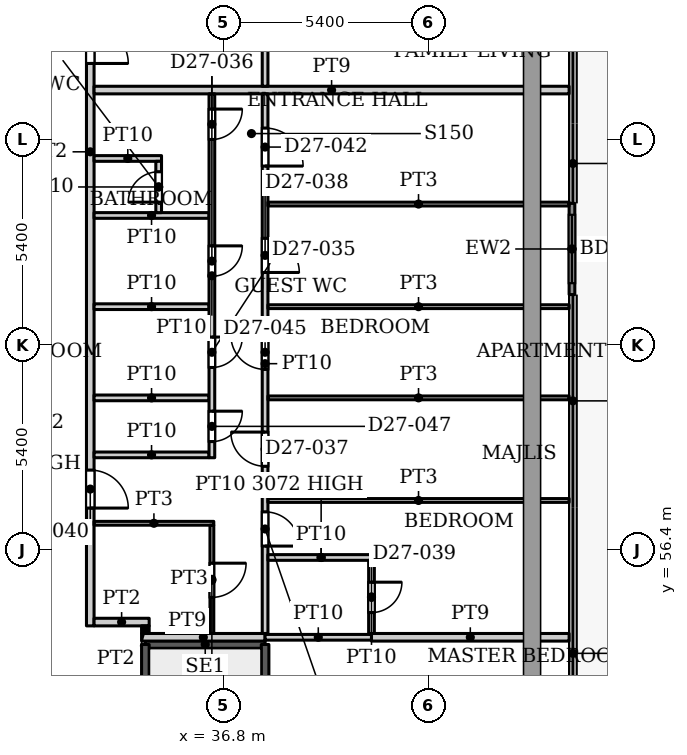
"""IFC4 building model, lengths in metres.
Left out: names, types, materials, properties, quantities, classifications, styles, units other than length and angle.
Written with IfcOpenShell. Run it as: python <this file> out.ifc"""

import sys

from ifc_helpers import new_model, si_unit, direction, frame, frame_2d, origin, place, context, subcontext, project, spatial, rectangle, extrude, source, transform, mapped, element, fill, save


model = new_model("IFC4")
c1 = context("Model", 3, precision=1e-05, world=origin(), true_north=direction((0.0, 1.0)))
c2 = subcontext(c1, "Body", "Model", "MODEL_VIEW")
j1 = project(units=[si_unit("LENGTHUNIT", "METRE"), si_unit("PLANEANGLEUNIT", "RADIAN")], contexts=[c1])
p1 = place(None, origin())
s1 = spatial("IfcSite", under=j1, at=p1, CompositionType="ELEMENT")
p2 = place(p1, origin())
s2 = spatial("IfcBuilding", under=s1, at=p2, CompositionType="ELEMENT")
p3 = place(p2, frame((0.0, 0.0, 121.4)))
s3 = spatial("IfcBuildingStorey", under=s2, at=p3, CompositionType="ELEMENT", Elevation=121.4)
p4 = place(p3, frame((45.975, 65.518, 0.0), z_axis=(0.0, 0.0, 1.0), x_axis=(0.0, -1.0, 0.0)))
e1 = element("IfcWall", 1, at=p4, inside=s3, PredefinedType="SOLIDWALL", context=c2, shape_type="SweptSolid", body=[
    extrude(rectangle(XDim=2.4, YDim=0.15, at=frame_2d((1.2, 0.0))), origin(), (0.0, 0.0, 1.0), 3.75),
])
p5 = place(p4, frame((0.3, 0.0, 0.0)))
e2 = element("IfcOpeningElement", 2, at=p5, cuts=e1, PredefinedType="OPENING", context=c2, shape_type="SweptSolid", body=[
    extrude(rectangle(XDim=1.8, YDim=2.4, at=frame_2d((0.9, 1.2))), frame((0.0, 0.085, 0.0), z_axis=(0.0, -1.0, 0.0), x_axis=(1.0, 0.0, 0.0)), (0.0, 0.0, 1.0), 0.17),
])
p6 = place(p3, frame((34.75, 53.91, 0.0), z_axis=(0.0, 0.0, 1.0), x_axis=(1.0, 0.0, 0.0)))
e3 = element("IfcWall", 3, at=p6, inside=s3, PredefinedType="SHEAR", context=c2, shape_type="SweptSolid", body=[
    extrude(rectangle(XDim=3.15, YDim=0.2, at=frame_2d((1.575, 0.0))), origin(), (0.0, 0.0, 1.0), 3.9),
])
p7 = place(p3, frame((34.75, 47.5, 0.0), z_axis=(0.0, 0.0, 1.0), x_axis=(0.0, 1.0, 0.0)))
e4 = element("IfcWall", 4, at=p7, inside=s3, PredefinedType="SHEAR", context=c2, shape_type="SweptSolid", body=[
    extrude(rectangle(XDim=6.41, YDim=0.2, at=frame_2d((3.205, 0.0))), origin(), (0.0, 0.0, 1.0), 3.9),
])
p8 = place(p3, frame((37.9, 44.75, 0.0), z_axis=(0.0, 0.0, 1.0), x_axis=(0.0, 1.0, 0.0)))
e5 = element("IfcWall", 5, at=p8, inside=s3, PredefinedType="SHEAR", context=c2, shape_type="SweptSolid", body=[
    extrude(rectangle(XDim=9.16, YDim=0.2, at=frame_2d((4.58, 0.0))), origin(), (0.0, 0.0, 1.0), 3.9),
])
p9 = place(p3, frame((33.3, 54.4, 0.0), z_axis=(0.0, 0.0, 1.0), x_axis=(0.0, 1.0, 0.0)))
e6 = element("IfcWall", 6, at=p9, inside=s3, PredefinedType="PARTITIONING", context=c2, shape_type="SweptSolid", body=[
    extrude(rectangle(XDim=24.95, YDim=0.2, at=frame_2d((12.475, 0.0))), origin(), (0.0, 0.0, 1.0), 3.6),
])
p10 = place(p9, frame((3.1, 0.0, 0.0)))
e7 = element("IfcOpeningElement", 7, at=p10, cuts=e6, PredefinedType="OPENING", context=c2, shape_type="SweptSolid", body=[
    extrude(rectangle(XDim=1.0, YDim=2.1, at=frame_2d((0.5, 1.05))), frame((0.0, 0.11, 0.0), z_axis=(0.0, -1.0, 0.0), x_axis=(1.0, 0.0, 0.0)), (0.0, 0.0, 1.0), 0.22),
])
p11 = place(p9, frame((14.8, 0.0, 0.0)))
e8 = element("IfcOpeningElement", 8, at=p11, cuts=e6, PredefinedType="OPENING", context=c2, shape_type="SweptSolid", body=[
    extrude(rectangle(XDim=1.0, YDim=2.1, at=frame_2d((0.5, 1.05))), frame((0.0, 0.11, 0.0), z_axis=(0.0, -1.0, 0.0), x_axis=(1.0, 0.0, 0.0)), (0.0, 0.0, 1.0), 0.22),
])
p12 = place(p3, frame((33.4, 54.5, 0.0), z_axis=(0.0, 0.0, 1.0), x_axis=(1.0, 0.0, 0.0)))
e9 = element("IfcWall", 9, at=p12, inside=s3, PredefinedType="PARTITIONING", context=c2, shape_type="SweptSolid", body=[
    extrude(rectangle(XDim=1.45, YDim=0.2, at=frame_2d((0.725, 0.0))), origin(), (0.0, 0.0, 1.0), 3.6),
])
p13 = place(p3, frame((33.4, 57.1, 0.0), z_axis=(0.0, 0.0, 1.0), x_axis=(1.0, 0.0, 0.0)))
e10 = element("IfcWall", 10, at=p13, inside=s3, PredefinedType="PARTITIONING", context=c2, shape_type="SweptSolid", body=[
    extrude(rectangle(XDim=3.15, YDim=0.1, at=frame_2d((1.575, 0.0))), origin(), (0.0, 0.0, 1.0), 3.6),
])
for number, where, z_axis, x_axis in (
    (11, (33.4, 58.9, 0.0), (0.0, 0.0, 1.0), (1.0, 0.0, 0.0)),
    (12, (33.4, 60.4, 0.0), (0.0, 0.0, 1.0), (1.0, 0.0, 0.0)),
    (13, (33.4, 62.8, 0.0), (0.0, 0.0, 1.0), (1.0, 0.0, 0.0)),
    (14, (33.4, 65.2, 0.0), (0.0, 0.0, 1.0), (1.0, 0.0, 0.0)),
):
    element("IfcWall", number, at=place(p3, frame(where, z_axis=z_axis, x_axis=x_axis)), inside=s3, PredefinedType="PARTITIONING", context=c2, shape_type="SweptSolid", body=[
        extrude(rectangle(XDim=3.025, YDim=0.15, at=frame_2d((1.513, 0.0))), origin(), (0.0, 0.0, 1.0), 3.6),
    ])
p14 = place(p3, frame((33.4, 66.7, 0.0), z_axis=(0.0, 0.0, 1.0), x_axis=(1.0, 0.0, 0.0)))
e15 = element("IfcWall", 15, at=p14, inside=s3, PredefinedType="PARTITIONING", context=c2, shape_type="SweptSolid", body=[
    extrude(rectangle(XDim=1.775, YDim=0.15, at=frame_2d((0.888, 0.0))), origin(), (0.0, 0.0, 1.0), 3.6),
])
p15 = place(p3, frame((33.4, 68.5, 0.0), z_axis=(0.0, 0.0, 1.0), x_axis=(1.0, 0.0, 0.0)))
e16 = element("IfcWall", 16, at=p15, inside=s3, PredefinedType="PARTITIONING", context=c2, shape_type="SweptSolid", body=[
    extrude(rectangle(XDim=12.5, YDim=0.2, at=frame_2d((6.25, 0.0))), origin(), (0.0, 0.0, 1.0), 3.6),
])
p16 = place(p3, frame((34.65, 54.1, 0.0), z_axis=(0.0, 0.0, 1.0), x_axis=(1.0, 0.0, 0.0)))
e17 = element("IfcWall", 17, at=p16, inside=s3, PredefinedType="PARTITIONING", context=c2, shape_type="SweptSolid", body=[
    extrude(rectangle(XDim=3.25, YDim=0.2, at=frame_2d((1.625, 0.0))), origin(), (0.0, 0.0, 1.0), 3.6),
])
p17 = place(p3, frame((34.75, 54.2, 0.0), z_axis=(0.0, 0.0, 1.0), x_axis=(0.0, 1.0, 0.0)))
e18 = element("IfcWall", 18, at=p17, inside=s3, PredefinedType="PARTITIONING", context=c2, shape_type="SweptSolid", body=[
    extrude(rectangle(XDim=0.2, YDim=0.2, at=frame_2d((0.1, 0.0))), origin(), (0.0, 0.0, 1.0), 3.6),
])
p18 = place(p3, frame((35.1, 65.275, 0.0), z_axis=(0.0, 0.0, 1.0), x_axis=(0.0, 1.0, 0.0)))
e19 = element("IfcWall", 19, at=p18, inside=s3, PredefinedType="PARTITIONING", context=c2, shape_type="SweptSolid", body=[
    extrude(rectangle(XDim=1.35, YDim=0.15, at=frame_2d((0.675, 0.0))), origin(), (0.0, 0.0, 1.0), 3.6),
])
p19 = place(p18, frame((0.275, 0.0, 0.0)))
e20 = element("IfcOpeningElement", 20, at=p19, cuts=e19, PredefinedType="OPENING", context=c2, shape_type="SweptSolid", body=[
    extrude(rectangle(XDim=0.8, YDim=2.1, at=frame_2d((0.4, 1.05))), frame((0.0, 0.085, 0.0), z_axis=(0.0, -1.0, 0.0), x_axis=(1.0, 0.0, 0.0)), (0.0, 0.0, 1.0), 0.17),
])
p20 = place(p3, frame((36.5, 54.2, 0.0), z_axis=(0.0, 0.0, 1.0), x_axis=(0.0, 1.0, 0.0)))
e21 = element("IfcWall", 21, at=p20, inside=s3, PredefinedType="PARTITIONING", context=c2, shape_type="SweptSolid", body=[
    extrude(rectangle(XDim=2.85, YDim=0.1, at=frame_2d((1.425, 0.0))), origin(), (0.0, 0.0, 1.0), 3.6),
])
p21 = place(p20, frame((0.95, 0.0, 0.0)))
e22 = element("IfcOpeningElement", 22, at=p21, cuts=e21, PredefinedType="OPENING", context=c2, shape_type="SweptSolid", body=[
    extrude(rectangle(XDim=0.9, YDim=2.1, at=frame_2d((0.45, 1.05))), frame((0.0, 0.06, 0.0), z_axis=(0.0, -1.0, 0.0), x_axis=(1.0, 0.0, 0.0)), (0.0, 0.0, 1.0), 0.12),
])
p22 = place(p3, frame((36.5, 58.825, 0.0), z_axis=(0.0, 0.0, 1.0), x_axis=(0.0, 1.0, 0.0)))
e23 = element("IfcWall", 23, at=p22, inside=s3, PredefinedType="PARTITIONING", context=c2, shape_type="SweptSolid", body=[
    extrude(rectangle(XDim=9.575, YDim=0.15, at=frame_2d((4.788, 0.0))), origin(), (0.0, 0.0, 1.0), 3.6),
])
p23 = place(p22, frame((2.375, 0.0, 0.0)))
e24 = element("IfcOpeningElement", 24, at=p23, cuts=e23, PredefinedType="OPENING", context=c2, shape_type="SweptSolid", body=[
    extrude(rectangle(XDim=0.8, YDim=2.1, at=frame_2d((0.4, 1.05))), frame((0.0, 0.085, 0.0), z_axis=(0.0, -1.0, 0.0), x_axis=(1.0, 0.0, 0.0)), (0.0, 0.0, 1.0), 0.17),
])
p24 = place(p22, frame((4.775, 0.0, 0.0)))
e25 = element("IfcOpeningElement", 25, at=p24, cuts=e23, PredefinedType="OPENING", context=c2, shape_type="SweptSolid", body=[
    extrude(rectangle(XDim=0.8, YDim=2.1, at=frame_2d((0.4, 1.05))), frame((0.0, 0.085, 0.0), z_axis=(0.0, -1.0, 0.0), x_axis=(1.0, 0.0, 0.0)), (0.0, 0.0, 1.0), 0.17),
])
p25 = place(p22, frame((8.375, 0.0, 0.0)))
e26 = element("IfcOpeningElement", 26, at=p25, cuts=e23, PredefinedType="OPENING", context=c2, shape_type="SweptSolid", body=[
    extrude(rectangle(XDim=0.8, YDim=2.1, at=frame_2d((0.4, 1.05))), frame((0.0, 0.085, 0.0), z_axis=(0.0, -1.0, 0.0), x_axis=(1.0, 0.0, 0.0)), (0.0, 0.0, 1.0), 0.17),
])
p26 = place(p22, frame((0.425, 0.0, 0.0)))
e27 = element("IfcOpeningElement", 27, at=p26, cuts=e23, PredefinedType="OPENING", context=c2, shape_type="SweptSolid", body=[
    extrude(rectangle(XDim=0.8, YDim=2.1, at=frame_2d((0.4, 1.05))), frame((0.0, 0.085, 0.0), z_axis=(0.0, -1.0, 0.0), x_axis=(1.0, 0.0, 0.0)), (0.0, 0.0, 1.0), 0.17),
])
p27 = place(p3, frame((37.9, 54.1, 0.0), z_axis=(0.0, 0.0, 1.0), x_axis=(1.0, 0.0, 0.0)))
e28 = element("IfcWall", 28, at=p27, inside=s3, PredefinedType="PARTITIONING", context=c2, shape_type="SweptSolid", body=[
    extrude(rectangle(XDim=2.8, YDim=0.15, at=frame_2d((1.4, 0.0))), origin(), (0.0, 0.0, 1.0), 3.6),
])
p28 = place(p3, frame((37.9, 54.2, 0.0), z_axis=(0.0, 0.0, 1.0), x_axis=(0.0, 1.0, 0.0)))
e29 = element("IfcWall", 29, at=p28, inside=s3, PredefinedType="PARTITIONING", context=c2, shape_type="SweptSolid", body=[
    extrude(rectangle(XDim=14.2, YDim=0.15, at=frame_2d((7.1, 0.0))), origin(), (0.0, 0.0, 1.0), 3.6),
])
p29 = place(p28, frame((4.4, 0.0, 0.0)))
e30 = element("IfcOpeningElement", 30, at=p29, cuts=e29, PredefinedType="OPENING", context=c2, shape_type="SweptSolid", body=[
    extrude(rectangle(XDim=0.9, YDim=2.1, at=frame_2d((0.45, 1.05))), frame((0.0, 0.085, 0.0), z_axis=(0.0, -1.0, 0.0), x_axis=(1.0, 0.0, 0.0)), (0.0, 0.0, 1.0), 0.17),
])
p30 = place(p28, frame((9.5, 0.0, 0.0)))
e31 = element("IfcOpeningElement", 31, at=p30, cuts=e29, PredefinedType="OPENING", context=c2, shape_type="SweptSolid", body=[
    extrude(rectangle(XDim=0.9, YDim=2.1, at=frame_2d((0.45, 1.05))), frame((0.0, 0.085, 0.0), z_axis=(0.0, -1.0, 0.0), x_axis=(1.0, 0.0, 0.0)), (0.0, 0.0, 1.0), 0.17),
])
p31 = place(p28, frame((12.3, 0.0, 0.0)))
e32 = element("IfcOpeningElement", 32, at=p31, cuts=e29, PredefinedType="OPENING", context=c2, shape_type="SweptSolid", body=[
    extrude(rectangle(XDim=1.0, YDim=2.1, at=frame_2d((0.5, 1.05))), frame((0.0, 0.085, 0.0), z_axis=(0.0, -1.0, 0.0), x_axis=(1.0, 0.0, 0.0)), (0.0, 0.0, 1.0), 0.17),
])
p32 = place(p28, frame((6.95, 0.0, 0.0)))
e33 = element("IfcOpeningElement", 33, at=p32, cuts=e29, PredefinedType="OPENING", context=c2, shape_type="SweptSolid", body=[
    extrude(rectangle(XDim=0.9, YDim=2.1, at=frame_2d((0.45, 1.05))), frame((0.0, 0.085, 0.0), z_axis=(0.0, -1.0, 0.0), x_axis=(1.0, 0.0, 0.0)), (0.0, 0.0, 1.0), 0.17),
])
p33 = place(p28, frame((2.3, 0.0, 0.0)))
e34 = element("IfcOpeningElement", 34, at=p33, cuts=e29, PredefinedType="OPENING", context=c2, shape_type="SweptSolid", body=[
    extrude(rectangle(XDim=0.9, YDim=2.1, at=frame_2d((0.45, 1.05))), frame((0.0, 0.085, 0.0), z_axis=(0.0, -1.0, 0.0), x_axis=(1.0, 0.0, 0.0)), (0.0, 0.0, 1.0), 0.17),
])
p34 = place(p3, frame((37.9, 68.6, 0.0), z_axis=(0.0, 0.0, 1.0), x_axis=(0.0, 1.0, 0.0)))
e35 = element("IfcWall", 35, at=p34, inside=s3, PredefinedType="PARTITIONING", context=c2, shape_type="SweptSolid", body=[
    extrude(rectangle(XDim=10.65, YDim=0.15, at=frame_2d((5.325, 0.0))), origin(), (0.0, 0.0, 1.0), 3.6),
])
p35 = place(p34, frame((1.25, 0.0, 0.0)))
e36 = element("IfcOpeningElement", 36, at=p35, cuts=e35, PredefinedType="OPENING", context=c2, shape_type="SweptSolid", body=[
    extrude(rectangle(XDim=0.9, YDim=2.1, at=frame_2d((0.45, 1.05))), frame((0.0, 0.085, 0.0), z_axis=(0.0, -1.0, 0.0), x_axis=(1.0, 0.0, 0.0)), (0.0, 0.0, 1.0), 0.17),
])
p36 = place(p34, frame((8.4, 0.0, 0.0)))
e37 = element("IfcOpeningElement", 37, at=p36, cuts=e35, PredefinedType="OPENING", context=c2, shape_type="SweptSolid", body=[
    extrude(rectangle(XDim=1.0, YDim=2.1, at=frame_2d((0.5, 1.05))), frame((0.0, 0.085, 0.0), z_axis=(0.0, -1.0, 0.0), x_axis=(1.0, 0.0, 0.0)), (0.0, 0.0, 1.0), 0.17),
])
p37 = place(p34, frame((3.8, 0.0, 0.0)))
e38 = element("IfcOpeningElement", 38, at=p37, cuts=e35, PredefinedType="OPENING", context=c2, shape_type="SweptSolid", body=[
    extrude(rectangle(XDim=0.9, YDim=2.1, at=frame_2d((0.45, 1.05))), frame((0.0, 0.085, 0.0), z_axis=(0.0, -1.0, 0.0), x_axis=(1.0, 0.0, 0.0)), (0.0, 0.0, 1.0), 0.17),
])
p38 = place(p3, frame((37.975, 56.2, 0.0), z_axis=(0.0, 0.0, 1.0), x_axis=(1.0, 0.0, 0.0)))
e39 = element("IfcWall", 39, at=p38, inside=s3, PredefinedType="PARTITIONING", context=c2, shape_type="SweptSolid", body=[
    extrude(rectangle(XDim=2.8, YDim=0.15, at=frame_2d((1.4, 0.0))), origin(), (0.0, 0.0, 1.0), 3.072),
])
for number, where, z_axis, x_axis in (
    (40, (37.975, 57.7, 0.0), (0.0, 0.0, 1.0), (1.0, 0.0, 0.0)),
    (41, (37.975, 60.4, 0.0), (0.0, 0.0, 1.0), (1.0, 0.0, 0.0)),
    (42, (37.975, 62.8, 0.0), (0.0, 0.0, 1.0), (1.0, 0.0, 0.0)),
    (43, (37.975, 65.5, 0.0), (0.0, 0.0, 1.0), (1.0, 0.0, 0.0)),
):
    element("IfcWall", number, at=place(p3, frame(where, z_axis=z_axis, x_axis=x_axis)), inside=s3, PredefinedType="PARTITIONING", context=c2, shape_type="SweptSolid", body=[
        extrude(rectangle(XDim=7.925, YDim=0.1, at=frame_2d((3.962, 0.0))), origin(), (0.0, 0.0, 1.0), 3.6),
    ])
p39 = place(p3, frame((40.7, 54.1, 0.0), z_axis=(0.0, 0.0, 1.0), x_axis=(1.0, 0.0, 0.0)))
e44 = element("IfcWall", 44, at=p39, inside=s3, PredefinedType="PARTITIONING", context=c2, shape_type="SweptSolid", body=[
    extrude(rectangle(XDim=5.2, YDim=0.2, at=frame_2d((2.6, 0.0))), origin(), (0.0, 0.0, 1.0), 3.6),
])
p40 = place(p3, frame((40.7, 54.2, 0.0), z_axis=(0.0, 0.0, 1.0), x_axis=(0.0, 1.0, 0.0)))
e45 = element("IfcWall", 45, at=p40, inside=s3, PredefinedType="PARTITIONING", context=c2, shape_type="SweptSolid", body=[
    extrude(rectangle(XDim=1.925, YDim=0.15, at=frame_2d((0.962, 0.0))), origin(), (0.0, 0.0, 1.0), 3.6),
])
p41 = place(p40, frame((0.55, 0.0, 0.0)))
e46 = element("IfcOpeningElement", 46, at=p41, cuts=e45, PredefinedType="OPENING", context=c2, shape_type="SweptSolid", body=[
    extrude(rectangle(XDim=0.8, YDim=2.1, at=frame_2d((0.4, 1.05))), frame((0.0, 0.085, 0.0), z_axis=(0.0, -1.0, 0.0), x_axis=(1.0, 0.0, 0.0)), (0.0, 0.0, 1.0), 0.17),
])
m1 = source(origin(), c2, "Body", "SweptSolid", [
    extrude(rectangle(XDim=1.8, YDim=2.4, at=frame_2d((0.9, 1.2))), frame((0.0, 0.025, 0.0), z_axis=(0.0, -1.0, 0.0), x_axis=(1.0, 0.0, 0.0)), (0.0, 0.0, 1.0), 0.05),
])
p42 = place(p5, origin())
e47 = element("IfcDoor", 47, at=p42, inside=s3, OperationType="SLIDING_TO_LEFT", PredefinedType="DOOR", context=c2, shape_type="MappedRepresentation", body=[
    mapped(m1, transform((0.0, 0.0, 0.0), x_axis=(1.0, 0.0, 0.0), y_axis=(0.0, 1.0, 0.0), z_axis=(0.0, 0.0, 1.0), scale=1.0)),
])
fill(e2, e47)
m2 = source(origin(), c2, "Body", "SweptSolid", [
    extrude(rectangle(XDim=0.8, YDim=2.1, at=frame_2d((0.4, 1.05))), frame((0.0, 0.025, 0.0), z_axis=(0.0, -1.0, 0.0), x_axis=(1.0, 0.0, 0.0)), (0.0, 0.0, 1.0), 0.05),
])
p43 = place(p23, origin())
e48 = element("IfcDoor", 48, at=p43, inside=s3, OperationType="SINGLE_SWING_RIGHT", PredefinedType="DOOR", context=c2, shape_type="MappedRepresentation", body=[
    mapped(m2, transform((0.0, 0.0, 0.0), x_axis=(1.0, 0.0, 0.0), y_axis=(0.0, 1.0, 0.0), z_axis=(0.0, 0.0, 1.0), scale=1.0)),
])
fill(e24, e48)
p44 = place(p24, origin())
e49 = element("IfcDoor", 49, at=p44, inside=s3, OperationType="SINGLE_SWING_RIGHT", PredefinedType="DOOR", context=c2, shape_type="MappedRepresentation", body=[
    mapped(m2, transform((0.0, 0.0, 0.0), x_axis=(1.0, 0.0, 0.0), y_axis=(0.0, 1.0, 0.0), z_axis=(0.0, 0.0, 1.0), scale=1.0)),
])
fill(e25, e49)
m3 = source(origin(), c2, "Body", "SweptSolid", [
    extrude(rectangle(XDim=0.9, YDim=2.1, at=frame_2d((0.45, 1.05))), frame((0.0, 0.025, 0.0), z_axis=(0.0, -1.0, 0.0), x_axis=(1.0, 0.0, 0.0)), (0.0, 0.0, 1.0), 0.05),
])
p45 = place(p29, origin())
e50 = element("IfcDoor", 50, at=p45, inside=s3, OperationType="SINGLE_SWING_LEFT", PredefinedType="DOOR", context=c2, shape_type="MappedRepresentation", body=[
    mapped(m3, transform((0.0, 0.0, 0.0), x_axis=(1.0, 0.0, 0.0), y_axis=(0.0, 1.0, 0.0), z_axis=(0.0, 0.0, 1.0), scale=1.0)),
])
fill(e30, e50)
p46 = place(p30, origin())
e51 = element("IfcDoor", 51, at=p46, inside=s3, OperationType="SINGLE_SWING_RIGHT", PredefinedType="DOOR", context=c2, shape_type="MappedRepresentation", body=[
    mapped(m3, transform((0.0, 0.0, 0.0), x_axis=(1.0, 0.0, 0.0), y_axis=(0.0, 1.0, 0.0), z_axis=(0.0, 0.0, 1.0), scale=1.0)),
])
fill(e31, e51)
p47 = place(p41, origin())
e52 = element("IfcDoor", 52, at=p47, inside=s3, OperationType="SINGLE_SWING_RIGHT", PredefinedType="DOOR", context=c2, shape_type="MappedRepresentation", body=[
    mapped(m2, transform((0.0, 0.0, 0.0), x_axis=(1.0, 0.0, 0.0), y_axis=(0.0, 1.0, 0.0), z_axis=(0.0, 0.0, 1.0), scale=1.0)),
])
fill(e46, e52)
m4 = source(origin(), c2, "Body", "SweptSolid", [
    extrude(rectangle(XDim=1.0, YDim=2.1, at=frame_2d((0.5, 1.05))), frame((0.0, 0.025, 0.0), z_axis=(0.0, -1.0, 0.0), x_axis=(1.0, 0.0, 0.0)), (0.0, 0.0, 1.0), 0.05),
])
p48 = place(p10, origin())
e53 = element("IfcDoor", 53, at=p48, inside=s3, OperationType="SINGLE_SWING_RIGHT", PredefinedType="DOOR", context=c2, shape_type="MappedRepresentation", body=[
    mapped(m4, transform((0.0, 0.0, 0.0), x_axis=(1.0, 0.0, 0.0), y_axis=(0.0, 1.0, 0.0), z_axis=(0.0, 0.0, 1.0), scale=1.0)),
])
fill(e7, e53)
p49 = place(p21, origin())
e54 = element("IfcDoor", 54, at=p49, inside=s3, OperationType="SINGLE_SWING_RIGHT", PredefinedType="DOOR", context=c2, shape_type="MappedRepresentation", body=[
    mapped(m3, transform((0.0, 0.0, 0.0), x_axis=(1.0, 0.0, 0.0), y_axis=(0.0, 1.0, 0.0), z_axis=(0.0, 0.0, 1.0), scale=1.0)),
])
fill(e22, e54)
m5 = source(origin(), c2, "Body", "SweptSolid", [
    extrude(rectangle(XDim=1.0, YDim=2.1, at=frame_2d((0.5, 1.05))), frame((0.0, 0.025, 0.0), z_axis=(0.0, -1.0, 0.0), x_axis=(1.0, 0.0, 0.0)), (0.0, 0.0, 1.0), 0.05),
])
p50 = place(p31, origin())
e55 = element("IfcDoor", 55, at=p50, inside=s3, OperationType="SINGLE_SWING_RIGHT", PredefinedType="DOOR", context=c2, shape_type="MappedRepresentation", body=[
    mapped(m5, transform((0.0, 0.0, 0.0), x_axis=(1.0, 0.0, 0.0), y_axis=(0.0, 1.0, 0.0), z_axis=(0.0, 0.0, 1.0), scale=1.0)),
])
fill(e32, e55)
p51 = place(p25, origin())
e56 = element("IfcDoor", 56, at=p51, inside=s3, OperationType="SINGLE_SWING_RIGHT", PredefinedType="DOOR", context=c2, shape_type="MappedRepresentation", body=[
    mapped(m2, transform((0.0, 0.0, 0.0), x_axis=(1.0, 0.0, 0.0), y_axis=(0.0, 1.0, 0.0), z_axis=(0.0, 0.0, 1.0), scale=1.0)),
])
fill(e26, e56)
p52 = place(p19, origin())
e57 = element("IfcDoor", 57, at=p52, inside=s3, OperationType="SINGLE_SWING_LEFT", PredefinedType="DOOR", context=c2, shape_type="MappedRepresentation", body=[
    mapped(m2, transform((0.0, 0.0, 0.0), x_axis=(1.0, 0.0, 0.0), y_axis=(0.0, 1.0, 0.0), z_axis=(0.0, 0.0, 1.0), scale=1.0)),
])
fill(e20, e57)
p53 = place(p32, origin())
e58 = element("IfcDoor", 58, at=p53, inside=s3, OperationType="SINGLE_SWING_LEFT", PredefinedType="DOOR", context=c2, shape_type="MappedRepresentation", body=[
    mapped(m3, transform((0.0, 0.0, 0.0), x_axis=(1.0, 0.0, 0.0), y_axis=(0.0, 1.0, 0.0), z_axis=(0.0, 0.0, 1.0), scale=1.0)),
])
fill(e33, e58)
p54 = place(p33, origin())
e59 = element("IfcDoor", 59, at=p54, inside=s3, OperationType="SINGLE_SWING_RIGHT", PredefinedType="DOOR", context=c2, shape_type="MappedRepresentation", body=[
    mapped(m3, transform((0.0, 0.0, 0.0), x_axis=(1.0, 0.0, 0.0), y_axis=(0.0, 1.0, 0.0), z_axis=(0.0, 0.0, 1.0), scale=1.0)),
])
fill(e34, e59)
p55 = place(p26, origin())
e60 = element("IfcDoor", 60, at=p55, inside=s3, OperationType="SINGLE_SWING_RIGHT", PredefinedType="DOOR", context=c2, shape_type="MappedRepresentation", body=[
    mapped(m2, transform((0.0, 0.0, 0.0), x_axis=(1.0, 0.0, 0.0), y_axis=(0.0, 1.0, 0.0), z_axis=(0.0, 0.0, 1.0), scale=1.0)),
])
fill(e27, e60)
p56 = place(p11, origin())
e61 = element("IfcDoor", 61, at=p56, inside=s3, OperationType="SINGLE_SWING_RIGHT", PredefinedType="DOOR", context=c2, shape_type="MappedRepresentation", body=[
    mapped(m4, transform((0.0, 0.0, 0.0), x_axis=(1.0, 0.0, 0.0), y_axis=(0.0, 1.0, 0.0), z_axis=(0.0, 0.0, 1.0), scale=1.0)),
])
fill(e8, e61)
save(model, sys.argv[1])
